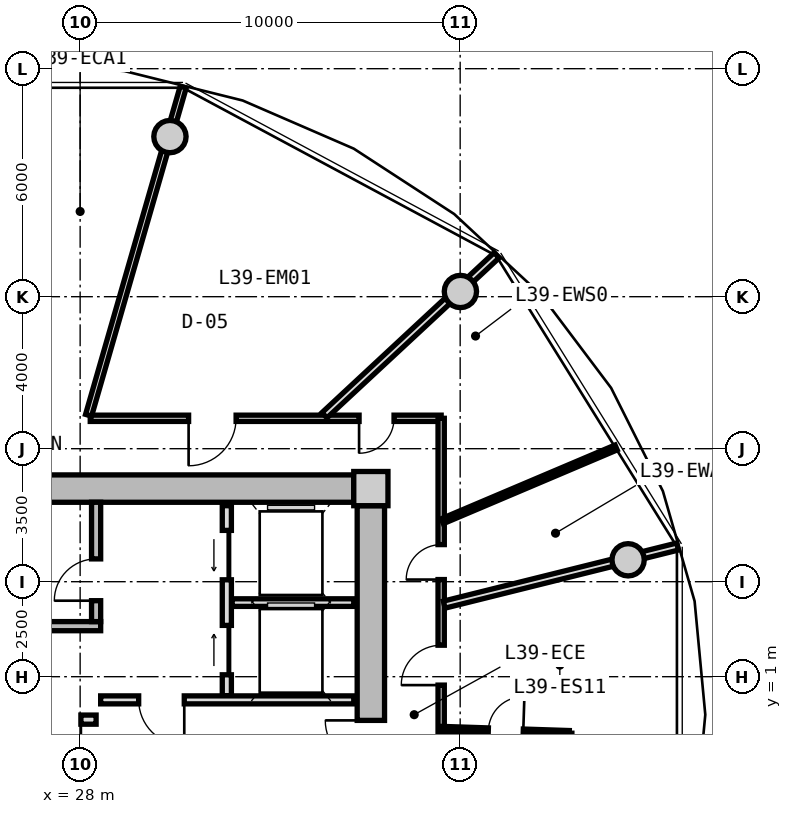
"""IFC4 building model, lengths in metres.
Left out: names, types, materials, properties, quantities, classifications, styles, units other than length and angle.
Written with IfcOpenShell. Run it as: python <this file> out.ifc"""

import sys

from ifc_helpers import new_model, si_unit, direction, frame, frame_2d, origin, origin_2d, place, context, subcontext, project, spatial, rectangle, circle, extrude, source, transform, mapped, element, fill, save


model = new_model("IFC4")
c1 = context("Model", 3, precision=1e-05, world=origin(), true_north=direction((0.0, 1.0)))
c2 = subcontext(c1, "Body", "Model", "MODEL_VIEW")
j1 = project(units=[si_unit("LENGTHUNIT", "METRE"), si_unit("PLANEANGLEUNIT", "RADIAN")], contexts=[c1])
p1 = place(None, origin())
s1 = spatial("IfcSite", under=j1, at=p1, CompositionType="ELEMENT")
p2 = place(p1, origin())
s2 = spatial("IfcBuilding", under=s1, at=p2, CompositionType="ELEMENT")
p3 = place(p2, frame((0.0, 0.0, 126.75)))
s3 = spatial("IfcBuildingStorey", under=s2, at=p3, CompositionType="ELEMENT", Elevation=126.75)
m1 = source(origin(), c2, "Body", "SweptSolid", [
    extrude(rectangle(XDim=0.9, YDim=0.9, at=origin_2d()), origin(), (0.0, 0.0, 1.0), 3.05),
])
p4 = place(p3, frame((35.65, 5.95, 0.0), z_axis=(0.0, 0.0, 1.0), x_axis=(1.0, 0.0, 0.0)))
e1 = element("IfcColumn", 1, at=p4, inside=s3, PredefinedType="COLUMN", context=c2, shape_type="MappedRepresentation", body=[
    mapped(m1, transform((0.0, 0.0, 0.0), x_axis=(1.0, 0.0, 0.0), y_axis=(0.0, 1.0, 0.0), z_axis=(0.0, 0.0, 1.0), scale=1.0)),
])
m2 = source(origin(), c2, "Body", "SweptSolid", [
    extrude(rectangle(XDim=14.4, YDim=0.72, at=frame_2d((7.2, 0.0))), origin(), (0.0, 0.0, 1.0), 2.73),
])
p5 = place(p3, frame((20.8, 5.95, 0.0), z_axis=(0.0, 0.0, 1.0), x_axis=(1.0, 0.0, 0.0)))
e2 = element("IfcWall", 2, at=p5, inside=s3, PredefinedType="SHEAR", context=c2, shape_type="MappedRepresentation", body=[
    mapped(m2, transform((0.0, 0.0, 0.0), x_axis=(1.0, 0.0, 0.0), y_axis=(0.0, 1.0, 0.0), z_axis=(0.0, 0.0, 1.0), scale=1.0)),
])
m3 = source(origin(), c2, "Body", "SweptSolid", [
    extrude(rectangle(XDim=11.0, YDim=0.72, at=frame_2d((5.5, 0.0))), origin(), (0.0, 0.0, 1.0), 2.73),
])
p6 = place(p3, frame((35.65, 5.5, 0.0), z_axis=(0.0, 0.0, 1.0), x_axis=(0.0, -1.0, 0.0)))
e3 = element("IfcWall", 3, at=p6, inside=s3, PredefinedType="SHEAR", context=c2, shape_type="MappedRepresentation", body=[
    mapped(m3, transform((0.0, 0.0, 0.0), x_axis=(1.0, 0.0, 0.0), y_axis=(0.0, 1.0, 0.0), z_axis=(0.0, 0.0, 1.0), scale=1.0)),
])
p7 = place(p6, frame((5.65, 0.0, 0.0)))
e4 = element("IfcOpeningElement", 4, at=p7, cuts=e3, PredefinedType="OPENING", context=c2, shape_type="SweptSolid", body=[
    extrude(rectangle(XDim=1.2, YDim=2.15, at=frame_2d((0.6, 1.075))), frame((0.0, 0.37, 0.0), z_axis=(0.0, -1.0, 0.0), x_axis=(1.0, 0.0, 0.0)), (0.0, 0.0, 1.0), 0.74),
])
m4 = source(origin(), c2, "Body", "SweptSolid", [
    extrude(circle(Radius=0.425, at=origin_2d()), origin(), (0.0, 0.0, 1.0), 3.05),
])
for number, where, z_axis, x_axis in (
    (5, (42.419, 4.076, 0.0), (0.0, 0.0, 1.0), (1.0, 0.0, 0.0)),
    (6, (38.006, 11.137, 0.0), (0.0, 0.0, 1.0), (1.0, 0.0, 0.0)),
    (7, (30.363, 15.213, 0.0), (0.0, 0.0, 1.0), (1.0, 0.0, 0.0)),
):
    element("IfcColumn", number, at=place(p3, frame(where, z_axis=z_axis, x_axis=x_axis)), inside=s3, PredefinedType="COLUMN", context=c2, shape_type="MappedRepresentation", body=[
        mapped(m4, transform((0.0, 0.0, 0.0), x_axis=(1.0, 0.0, 0.0), y_axis=(0.0, 1.0, 0.0), z_axis=(0.0, 0.0, 1.0), scale=1.0)),
    ])
m5 = source(origin(), c2, "Body", "SweptSolid", [
    extrude(rectangle(XDim=7.83, YDim=0.24, at=frame_2d((3.915, 0.0))), origin(), (0.0, 0.0, 1.0), 2.73),
])
p8 = place(p3, frame((20.71, 2.33, 0.0), z_axis=(0.0, 0.0, 1.0), x_axis=(1.0, 0.0, 0.0)))
e8 = element("IfcWall", 8, at=p8, inside=s3, PredefinedType="PARTITIONING", context=c2, shape_type="MappedRepresentation", body=[
    mapped(m5, transform((0.0, 0.0, 0.0), x_axis=(1.0, 0.0, 0.0), y_axis=(0.0, 1.0, 0.0), z_axis=(0.0, 0.0, 1.0), scale=1.0)),
])
m6 = source(origin(), c2, "Body", "SweptSolid", [
    extrude(rectangle(XDim=3.14, YDim=0.24, at=frame_2d((1.57, 0.0))), origin(), (0.0, 0.0, 1.0), 2.73),
])
p9 = place(p3, frame((28.42, 2.45, 0.0), z_axis=(0.0, 0.0, 1.0), x_axis=(0.0, 1.0, 0.0)))
e9 = element("IfcWall", 9, at=p9, inside=s3, PredefinedType="PARTITIONING", context=c2, shape_type="MappedRepresentation", body=[
    mapped(m6, transform((0.0, 0.0, 0.0), x_axis=(1.0, 0.0, 0.0), y_axis=(0.0, 1.0, 0.0), z_axis=(0.0, 0.0, 1.0), scale=1.0)),
])
p10 = place(p9, frame((0.55, 0.0, 0.0)))
e10 = element("IfcOpeningElement", 10, at=p10, cuts=e9, PredefinedType="OPENING", context=c2, shape_type="SweptSolid", body=[
    extrude(rectangle(XDim=1.1, YDim=2.15, at=frame_2d((0.55, 1.075))), frame((0.0, 0.13, 0.0), z_axis=(0.0, -1.0, 0.0), x_axis=(1.0, 0.0, 0.0)), (0.0, 0.0, 1.0), 0.26),
])
m7 = source(origin(), c2, "Body", "SweptSolid", [
    extrude(rectangle(XDim=5.0, YDim=0.24, at=frame_2d((2.5, 0.0))), origin(), (0.0, 0.0, 1.0), 2.715),
])
p11 = place(p3, frame((31.86, 0.5, 0.0), z_axis=(0.0, 0.0, 1.0), x_axis=(0.0, 1.0, 0.0)))
e11 = element("IfcWall", 11, at=p11, inside=s3, PredefinedType="PARTITIONING", context=c2, shape_type="MappedRepresentation", body=[
    mapped(m7, transform((0.0, 0.0, 0.0), x_axis=(1.0, 0.0, 0.0), y_axis=(0.0, 1.0, 0.0), z_axis=(0.0, 0.0, 1.0), scale=1.0)),
])
p12 = place(p11, frame((3.05, 0.0, 0.0)))
e12 = element("IfcOpeningElement", 12, at=p12, cuts=e11, PredefinedType="OPENING", context=c2, shape_type="SweptSolid", body=[
    extrude(rectangle(XDim=1.3, YDim=2.2, at=frame_2d((0.65, 1.1))), frame((0.0, 0.13, 0.0), z_axis=(0.0, -1.0, 0.0), x_axis=(1.0, 0.0, 0.0)), (0.0, 0.0, 1.0), 0.26),
])
p13 = place(p11, frame((0.55, 0.0, 0.0)))
e13 = element("IfcOpeningElement", 13, at=p13, cuts=e11, PredefinedType="OPENING", context=c2, shape_type="SweptSolid", body=[
    extrude(rectangle(XDim=1.3, YDim=2.2, at=frame_2d((0.65, 1.1))), frame((0.0, 0.13, 0.0), z_axis=(0.0, -1.0, 0.0), x_axis=(1.0, 0.0, 0.0)), (0.0, 0.0, 1.0), 0.26),
])
m8 = source(origin(), c2, "Body", "SweptSolid", [
    extrude(rectangle(XDim=3.2, YDim=0.2, at=frame_2d((1.6, 0.0))), origin(), (0.0, 0.0, 1.0), 2.715),
])
p14 = place(p3, frame((32.0, 2.95, 0.0), z_axis=(0.0, 0.0, 1.0), x_axis=(1.0, 0.0, 0.0)))
e14 = element("IfcWall", 14, at=p14, inside=s3, PredefinedType="PARTITIONING", context=c2, shape_type="MappedRepresentation", body=[
    mapped(m8, transform((0.0, 0.0, 0.0), x_axis=(1.0, 0.0, 0.0), y_axis=(0.0, 1.0, 0.0), z_axis=(0.0, 0.0, 1.0), scale=1.0)),
])
m9 = source(origin(), c2, "Body", "SweptSolid", [
    extrude(rectangle(XDim=6.66, YDim=0.21, at=frame_2d((3.33, 0.0))), origin(), (0.0, 0.0, 1.0), 2.715),
])
p15 = place(p3, frame((28.54, 0.39, 0.0), z_axis=(0.0, 0.0, 1.0), x_axis=(1.0, 0.0, 0.0)))
e15 = element("IfcWall", 15, at=p15, inside=s3, PredefinedType="PARTITIONING", context=c2, shape_type="MappedRepresentation", body=[
    mapped(m9, transform((0.0, 0.0, 0.0), x_axis=(1.0, 0.0, 0.0), y_axis=(0.0, 1.0, 0.0), z_axis=(0.0, 0.0, 1.0), scale=1.0)),
])
p16 = place(p15, frame((1.0, 0.0, 0.0)))
e16 = element("IfcOpeningElement", 16, at=p16, cuts=e15, PredefinedType="OPENING", context=c2, shape_type="SweptSolid", body=[
    extrude(rectangle(XDim=1.2, YDim=2.15, at=frame_2d((0.6, 1.075))), frame((0.0, 0.115, 0.0), z_axis=(0.0, -1.0, 0.0), x_axis=(1.0, 0.0, 0.0)), (0.0, 0.0, 1.0), 0.23),
])
m10 = source(origin(), c2, "Body", "SweptSolid", [
    extrude(rectangle(XDim=7.62, YDim=0.24, at=frame_2d((3.81, 0.0))), origin(), (0.0, 0.0, 1.0), 2.715),
])
p17 = place(p3, frame((20.8, -0.13, 0.0), z_axis=(0.0, 0.0, 1.0), x_axis=(1.0, 0.0, 0.0)))
e17 = element("IfcWall", 17, at=p17, inside=s3, PredefinedType="PARTITIONING", context=c2, shape_type="MappedRepresentation", body=[
    mapped(m10, transform((0.0, 0.0, 0.0), x_axis=(1.0, 0.0, 0.0), y_axis=(0.0, 1.0, 0.0), z_axis=(0.0, 0.0, 1.0), scale=1.0)),
])
p18 = place(p17, frame((6.22, 0.0, 0.0)))
e18 = element("IfcOpeningElement", 18, at=p18, cuts=e17, PredefinedType="OPENING", context=c2, shape_type="SweptSolid", body=[
    extrude(rectangle(XDim=1.0, YDim=2.1, at=frame_2d((0.5, 1.05))), frame((0.0, 0.13, 0.0), z_axis=(0.0, -1.0, 0.0), x_axis=(1.0, 0.0, 0.0)), (0.0, 0.0, 1.0), 0.26),
])
p19 = place(p17, frame((2.4, 0.0, 0.0)))
e19 = element("IfcOpeningElement", 19, at=p19, cuts=e17, PredefinedType="OPENING", context=c2, shape_type="SweptSolid", body=[
    extrude(rectangle(XDim=1.0, YDim=2.1, at=frame_2d((0.5, 1.05))), frame((0.0, 0.13, 0.0), z_axis=(0.0, -1.0, 0.0), x_axis=(1.0, 0.0, 0.0)), (0.0, 0.0, 1.0), 0.26),
])
m11 = source(origin(), c2, "Body", "SweptSolid", [
    extrude(rectangle(XDim=9.234, YDim=0.165, at=frame_2d((4.617, 0.0))), origin(), (0.0, 0.0, 1.0), 2.715),
])
p20 = place(p3, frame((28.266, 7.8, 0.0), z_axis=(0.0, 0.0, 1.0), x_axis=(1.0, 0.0, 0.0)))
e20 = element("IfcWall", 20, at=p20, inside=s3, PredefinedType="PARTITIONING", context=c2, shape_type="MappedRepresentation", body=[
    mapped(m11, transform((0.0, 0.0, 0.0), x_axis=(1.0, 0.0, 0.0), y_axis=(0.0, 1.0, 0.0), z_axis=(0.0, 0.0, 1.0), scale=1.0)),
])
p21 = place(p20, frame((7.074, 0.0, 0.0)))
e21 = element("IfcOpeningElement", 21, at=p21, cuts=e20, PredefinedType="OPENING", context=c2, shape_type="SweptSolid", body=[
    extrude(rectangle(XDim=0.92, YDim=2.1, at=frame_2d((0.46, 1.05))), frame((0.0, 0.093, 0.0), z_axis=(0.0, -1.0, 0.0), x_axis=(1.0, 0.0, 0.0)), (0.0, 0.0, 1.0), 0.185),
])
p22 = place(p20, frame((2.588, 0.0, 0.0)))
e22 = element("IfcOpeningElement", 22, at=p22, cuts=e20, PredefinedType="OPENING", context=c2, shape_type="SweptSolid", body=[
    extrude(rectangle(XDim=1.25, YDim=2.2, at=frame_2d((0.625, 1.1))), frame((0.0, 0.093, 0.0), z_axis=(0.0, -1.0, 0.0), x_axis=(1.0, 0.0, 0.0)), (0.0, 0.0, 1.0), 0.185),
])
m12 = source(origin(), c2, "Body", "SweptSolid", [
    extrude(rectangle(XDim=15.6, YDim=0.165, at=frame_2d((7.8, 0.0))), origin(), (0.0, 0.0, 1.0), 2.715),
])
p23 = place(p3, frame((37.5, 7.8, 0.0), z_axis=(0.0, 0.0, 1.0), x_axis=(0.0, -1.0, 0.0)))
e23 = element("IfcWall", 23, at=p23, inside=s3, PredefinedType="PARTITIONING", context=c2, shape_type="MappedRepresentation", body=[
    mapped(m12, transform((0.0, 0.0, 0.0), x_axis=(1.0, 0.0, 0.0), y_axis=(0.0, 1.0, 0.0), z_axis=(0.0, 0.0, 1.0), scale=1.0)),
])
p24 = place(p23, frame((12.094, 0.0, 0.0)))
e24 = element("IfcOpeningElement", 24, at=p24, cuts=e23, PredefinedType="OPENING", context=c2, shape_type="SweptSolid", body=[
    extrude(rectangle(XDim=1.05, YDim=2.15, at=frame_2d((0.525, 1.075))), frame((0.0, 0.093, 0.0), z_axis=(0.0, -1.0, 0.0), x_axis=(1.0, 0.0, 0.0)), (0.0, 0.0, 1.0), 0.185),
])
p25 = place(p23, frame((5.971, 0.0, 0.0)))
e25 = element("IfcOpeningElement", 25, at=p25, cuts=e23, PredefinedType="OPENING", context=c2, shape_type="SweptSolid", body=[
    extrude(rectangle(XDim=1.05, YDim=2.15, at=frame_2d((0.525, 1.075))), frame((0.0, 0.093, 0.0), z_axis=(0.0, -1.0, 0.0), x_axis=(1.0, 0.0, 0.0)), (0.0, 0.0, 1.0), 0.185),
])
p26 = place(p23, frame((3.324, 0.0, 0.0)))
e26 = element("IfcOpeningElement", 26, at=p26, cuts=e23, PredefinedType="OPENING", context=c2, shape_type="SweptSolid", body=[
    extrude(rectangle(XDim=0.92, YDim=2.1, at=frame_2d((0.46, 1.05))), frame((0.0, 0.093, 0.0), z_axis=(0.0, -1.0, 0.0), x_axis=(1.0, 0.0, 0.0)), (0.0, 0.0, 1.0), 0.185),
])
m13 = source(origin(), c2, "Body", "SweptSolid", [
    extrude(rectangle(XDim=8.989, YDim=0.165, at=frame_2d((4.495, 0.0))), origin(), (0.0, 0.0, 1.0), 2.215),
])
p27 = place(p3, frame((28.222, 7.88, 0.0), z_axis=(0.0, 0.0, 1.0), x_axis=(0.27702323008, 0.960863221274, 0.0)))
e27 = element("IfcWall", 27, at=p27, inside=s3, PredefinedType="PARTITIONING", context=c2, shape_type="MappedRepresentation", body=[
    mapped(m13, transform((0.0, 0.0, 0.0), x_axis=(1.0, 0.0, 0.0), y_axis=(0.0, 1.0, 0.0), z_axis=(0.0, 0.0, 1.0), scale=1.0)),
])
m14 = source(origin(), c2, "Body", "SweptSolid", [
    extrude(rectangle(XDim=6.331, YDim=0.19, at=frame_2d((3.165, 0.0))), origin(), (0.0, 0.0, 1.0), 2.215),
])
p28 = place(p3, frame((37.58, 2.896, 0.0), z_axis=(0.0, 0.0, 1.0), x_axis=(0.97036440661, 0.241646267062, 0.0)))
e28 = element("IfcWall", 28, at=p28, inside=s3, PredefinedType="PARTITIONING", context=c2, shape_type="MappedRepresentation", body=[
    mapped(m14, transform((0.0, 0.0, 0.0), x_axis=(1.0, 0.0, 0.0), y_axis=(0.0, 1.0, 0.0), z_axis=(0.0, 0.0, 1.0), scale=1.0)),
])
m15 = source(origin(), c2, "Body", "SweptSolid", [
    extrude(rectangle(XDim=3.342, YDim=0.14, at=frame_2d((1.671, 0.0))), origin(), (0.0, 0.0, 1.0), 2.715),
])
p29 = place(p3, frame((37.53, -0.378, 0.0), z_axis=(0.0, 0.0, 1.0), x_axis=(0.999468967034, -0.032585026264, 0.0)))
e29 = element("IfcWall", 29, at=p29, inside=s3, PredefinedType="PARTITIONING", context=c2, shape_type="MappedRepresentation", body=[
    mapped(m15, transform((0.0, 0.0, 0.0), x_axis=(1.0, 0.0, 0.0), y_axis=(0.0, 1.0, 0.0), z_axis=(0.0, 0.0, 1.0), scale=1.0)),
])
p30 = place(p29, frame((1.211, 0.0, 0.0)))
e30 = element("IfcOpeningElement", 30, at=p30, cuts=e29, PredefinedType="OPENING", context=c2, shape_type="SweptSolid", body=[
    extrude(rectangle(XDim=0.92, YDim=2.1, at=frame_2d((0.46, 1.05))), frame((0.0, 0.08, 0.0), z_axis=(0.0, -1.0, 0.0), x_axis=(1.0, 0.0, 0.0)), (0.0, 0.0, 1.0), 0.16),
])
m16 = source(origin(), c2, "Body", "SweptSolid", [
    extrude(rectangle(XDim=3.247, YDim=0.14, at=frame_2d((1.624, 0.0))), origin(), (0.0, 0.0, 1.0), 2.715),
])
p31 = place(p3, frame((40.87, -0.487, 0.0), z_axis=(0.0, 0.0, 1.0), x_axis=(-0.002105100215, -0.999997784274, 0.0)))
e31 = element("IfcWall", 31, at=p31, inside=s3, PredefinedType="PARTITIONING", context=c2, shape_type="MappedRepresentation", body=[
    mapped(m16, transform((0.0, 0.0, 0.0), x_axis=(1.0, 0.0, 0.0), y_axis=(0.0, 1.0, 0.0), z_axis=(0.0, 0.0, 1.0), scale=1.0)),
])
m17 = source(origin(), c2, "Body", "SweptSolid", [
    extrude(rectangle(XDim=6.187, YDim=0.19, at=frame_2d((3.093, 0.0))), origin(), (0.0, 0.0, 1.0), 2.215),
])
p32 = place(p3, frame((34.429, 7.88, 0.0), z_axis=(0.0, 0.0, 1.0), x_axis=(0.732501077882, 0.680765870841, 0.0)))
e32 = element("IfcWall", 32, at=p32, inside=s3, PredefinedType="PARTITIONING", context=c2, shape_type="MappedRepresentation", body=[
    mapped(m17, transform((0.0, 0.0, 0.0), x_axis=(1.0, 0.0, 0.0), y_axis=(0.0, 1.0, 0.0), z_axis=(0.0, 0.0, 1.0), scale=1.0)),
])
m18 = source(origin(), c2, "Body", "SweptSolid", [
    extrude(rectangle(XDim=4.968, YDim=0.14, at=frame_2d((2.484, 0.0))), origin(), (0.0, 0.0, 1.0), 2.715),
])
p33 = place(p3, frame((37.53, 5.092, 0.0), z_axis=(0.0, 0.0, 1.0), x_axis=(0.920595165864, 0.39051829738, 0.0)))
e33 = element("IfcWall", 33, at=p33, inside=s3, PredefinedType="PARTITIONING", context=c2, shape_type="MappedRepresentation", body=[
    mapped(m18, transform((0.0, 0.0, 0.0), x_axis=(1.0, 0.0, 0.0), y_axis=(0.0, 1.0, 0.0), z_axis=(0.0, 0.0, 1.0), scale=1.0)),
])
m19 = source(origin(), c2, "Body", "SweptSolid", [
    extrude(rectangle(XDim=1.1, YDim=2.15, at=frame_2d((0.55, 1.075))), frame((0.0, 0.025, 0.0), z_axis=(0.0, -1.0, 0.0), x_axis=(1.0, 0.0, 0.0)), (0.0, 0.0, 1.0), 0.05),
])
p34 = place(p10, origin())
e34 = element("IfcDoor", 34, at=p34, inside=s3, OperationType="SINGLE_SWING_LEFT", PredefinedType="DOOR", context=c2, shape_type="MappedRepresentation", body=[
    mapped(m19, transform((0.0, 0.0, 0.0), x_axis=(1.0, 0.0, 0.0), y_axis=(0.0, 1.0, 0.0), z_axis=(0.0, 0.0, 1.0), scale=1.0)),
])
fill(e10, e34)
m20 = source(origin(), c2, "Body", "SweptSolid", [
    extrude(rectangle(XDim=1.3, YDim=2.2, at=frame_2d((0.65, 1.1))), frame((0.0, 0.025, 0.0), z_axis=(0.0, -1.0, 0.0), x_axis=(1.0, 0.0, 0.0)), (0.0, 0.0, 1.0), 0.05),
])
p35 = place(p12, origin())
e35 = element("IfcDoor", 35, at=p35, inside=s3, OperationType="SLIDING_TO_LEFT", PredefinedType="DOOR", context=c2, shape_type="MappedRepresentation", body=[
    mapped(m20, transform((0.0, 0.0, 0.0), x_axis=(1.0, 0.0, 0.0), y_axis=(0.0, 1.0, 0.0), z_axis=(0.0, 0.0, 1.0), scale=1.0)),
])
fill(e12, e35)
p36 = place(p13, origin())
e36 = element("IfcDoor", 36, at=p36, inside=s3, OperationType="SLIDING_TO_RIGHT", PredefinedType="DOOR", context=c2, shape_type="MappedRepresentation", body=[
    mapped(m20, transform((0.0, 0.0, 0.0), x_axis=(1.0, 0.0, 0.0), y_axis=(0.0, 1.0, 0.0), z_axis=(0.0, 0.0, 1.0), scale=1.0)),
])
fill(e13, e36)
m21 = source(origin(), c2, "Body", "SweptSolid", [
    extrude(rectangle(XDim=1.2, YDim=2.15, at=frame_2d((0.6, 1.075))), frame((0.0, 0.025, 0.0), z_axis=(0.0, -1.0, 0.0), x_axis=(1.0, 0.0, 0.0)), (0.0, 0.0, 1.0), 0.05),
])
p37 = place(p16, frame((1.2, 0.0, 0.0), z_axis=(0.0, 0.0, 1.0), x_axis=(-1.0, 0.0, 0.0)))
e37 = element("IfcDoor", 37, at=p37, inside=s3, OperationType="SINGLE_SWING_LEFT", PredefinedType="DOOR", context=c2, shape_type="MappedRepresentation", body=[
    mapped(m21, transform((0.0, 0.0, 0.0), x_axis=(1.0, 0.0, 0.0), y_axis=(0.0, 1.0, 0.0), z_axis=(0.0, 0.0, 1.0), scale=1.0)),
])
fill(e16, e37)
p38 = place(p7, frame((1.2, 0.0, 0.0), z_axis=(0.0, 0.0, 1.0), x_axis=(-1.0, 0.0, 0.0)))
e38 = element("IfcDoor", 38, at=p38, inside=s3, OperationType="SINGLE_SWING_RIGHT", PredefinedType="DOOR", context=c2, shape_type="MappedRepresentation", body=[
    mapped(m21, transform((0.0, 0.0, 0.0), x_axis=(1.0, 0.0, 0.0), y_axis=(0.0, 1.0, 0.0), z_axis=(0.0, 0.0, 1.0), scale=1.0)),
])
fill(e4, e38)
m22 = source(origin(), c2, "Body", "SweptSolid", [
    extrude(rectangle(XDim=1.0, YDim=2.1, at=frame_2d((0.5, 1.05))), frame((0.0, 0.025, 0.0), z_axis=(0.0, -1.0, 0.0), x_axis=(1.0, 0.0, 0.0)), (0.0, 0.0, 1.0), 0.05),
])
p39 = place(p18, frame((1.0, 0.0, 0.0), z_axis=(0.0, 0.0, 1.0), x_axis=(-1.0, 0.0, 0.0)))
e39 = element("IfcDoor", 39, at=p39, inside=s3, OperationType="SINGLE_SWING_LEFT", PredefinedType="DOOR", context=c2, shape_type="MappedRepresentation", body=[
    mapped(m22, transform((0.0, 0.0, 0.0), x_axis=(1.0, 0.0, 0.0), y_axis=(0.0, 1.0, 0.0), z_axis=(0.0, 0.0, 1.0), scale=1.0)),
])
fill(e18, e39)
m23 = source(origin(), c2, "Body", "SweptSolid", [
    extrude(rectangle(XDim=1.05, YDim=2.15, at=frame_2d((0.525, 1.075))), frame((0.0, 0.025, 0.0), z_axis=(0.0, -1.0, 0.0), x_axis=(1.0, 0.0, 0.0)), (0.0, 0.0, 1.0), 0.05),
])
p40 = place(p25, frame((1.05, 0.0, 0.0), z_axis=(0.0, 0.0, 1.0), x_axis=(-1.0, 0.0, 0.0)))
e40 = element("IfcDoor", 40, at=p40, inside=s3, OperationType="SINGLE_SWING_LEFT", PredefinedType="DOOR", context=c2, shape_type="MappedRepresentation", body=[
    mapped(m23, transform((0.0, 0.0, 0.0), x_axis=(1.0, 0.0, 0.0), y_axis=(0.0, 1.0, 0.0), z_axis=(0.0, 0.0, 1.0), scale=1.0)),
])
fill(e25, e40)
m24 = source(origin(), c2, "Body", "SweptSolid", [
    extrude(rectangle(XDim=0.92, YDim=2.1, at=frame_2d((0.46, 1.05))), frame((0.0, 0.025, 0.0), z_axis=(0.0, -1.0, 0.0), x_axis=(1.0, 0.0, 0.0)), (0.0, 0.0, 1.0), 0.05),
])
p41 = place(p30, origin())
e41 = element("IfcDoor", 41, at=p41, inside=s3, OperationType="SINGLE_SWING_RIGHT", PredefinedType="DOOR", context=c2, shape_type="MappedRepresentation", body=[
    mapped(m24, transform((0.0, 0.0, 0.0), x_axis=(1.0, 0.0, 0.0), y_axis=(0.0, 1.0, 0.0), z_axis=(0.0, 0.0, 1.0), scale=1.0)),
])
fill(e30, e41)
p42 = place(p26, frame((0.92, 0.0, 0.0), z_axis=(0.0, 0.0, 1.0), x_axis=(-1.0, 0.0, 0.0)))
e42 = element("IfcDoor", 42, at=p42, inside=s3, OperationType="SINGLE_SWING_LEFT", PredefinedType="DOOR", context=c2, shape_type="MappedRepresentation", body=[
    mapped(m24, transform((0.0, 0.0, 0.0), x_axis=(1.0, 0.0, 0.0), y_axis=(0.0, 1.0, 0.0), z_axis=(0.0, 0.0, 1.0), scale=1.0)),
])
fill(e26, e42)
p43 = place(p21, frame((0.92, 0.0, 0.0), z_axis=(0.0, 0.0, 1.0), x_axis=(-1.0, 0.0, 0.0)))
e43 = element("IfcDoor", 43, at=p43, inside=s3, OperationType="SINGLE_SWING_RIGHT", PredefinedType="DOOR", context=c2, shape_type="MappedRepresentation", body=[
    mapped(m24, transform((0.0, 0.0, 0.0), x_axis=(1.0, 0.0, 0.0), y_axis=(0.0, 1.0, 0.0), z_axis=(0.0, 0.0, 1.0), scale=1.0)),
])
fill(e21, e43)
m25 = source(origin(), c2, "Body", "SweptSolid", [
    extrude(rectangle(XDim=1.25, YDim=2.2, at=frame_2d((0.625, 1.1))), frame((0.0, 0.025, 0.0), z_axis=(0.0, -1.0, 0.0), x_axis=(1.0, 0.0, 0.0)), (0.0, 0.0, 1.0), 0.05),
])
p44 = place(p22, frame((1.25, 0.0, 0.0), z_axis=(0.0, 0.0, 1.0), x_axis=(-1.0, 0.0, 0.0)))
e44 = element("IfcDoor", 44, at=p44, inside=s3, OperationType="SINGLE_SWING_RIGHT", PredefinedType="DOOR", context=c2, shape_type="MappedRepresentation", body=[
    mapped(m25, transform((0.0, 0.0, 0.0), x_axis=(1.0, 0.0, 0.0), y_axis=(0.0, 1.0, 0.0), z_axis=(0.0, 0.0, 1.0), scale=1.0)),
])
fill(e22, e44)
save(model, sys.argv[1])
